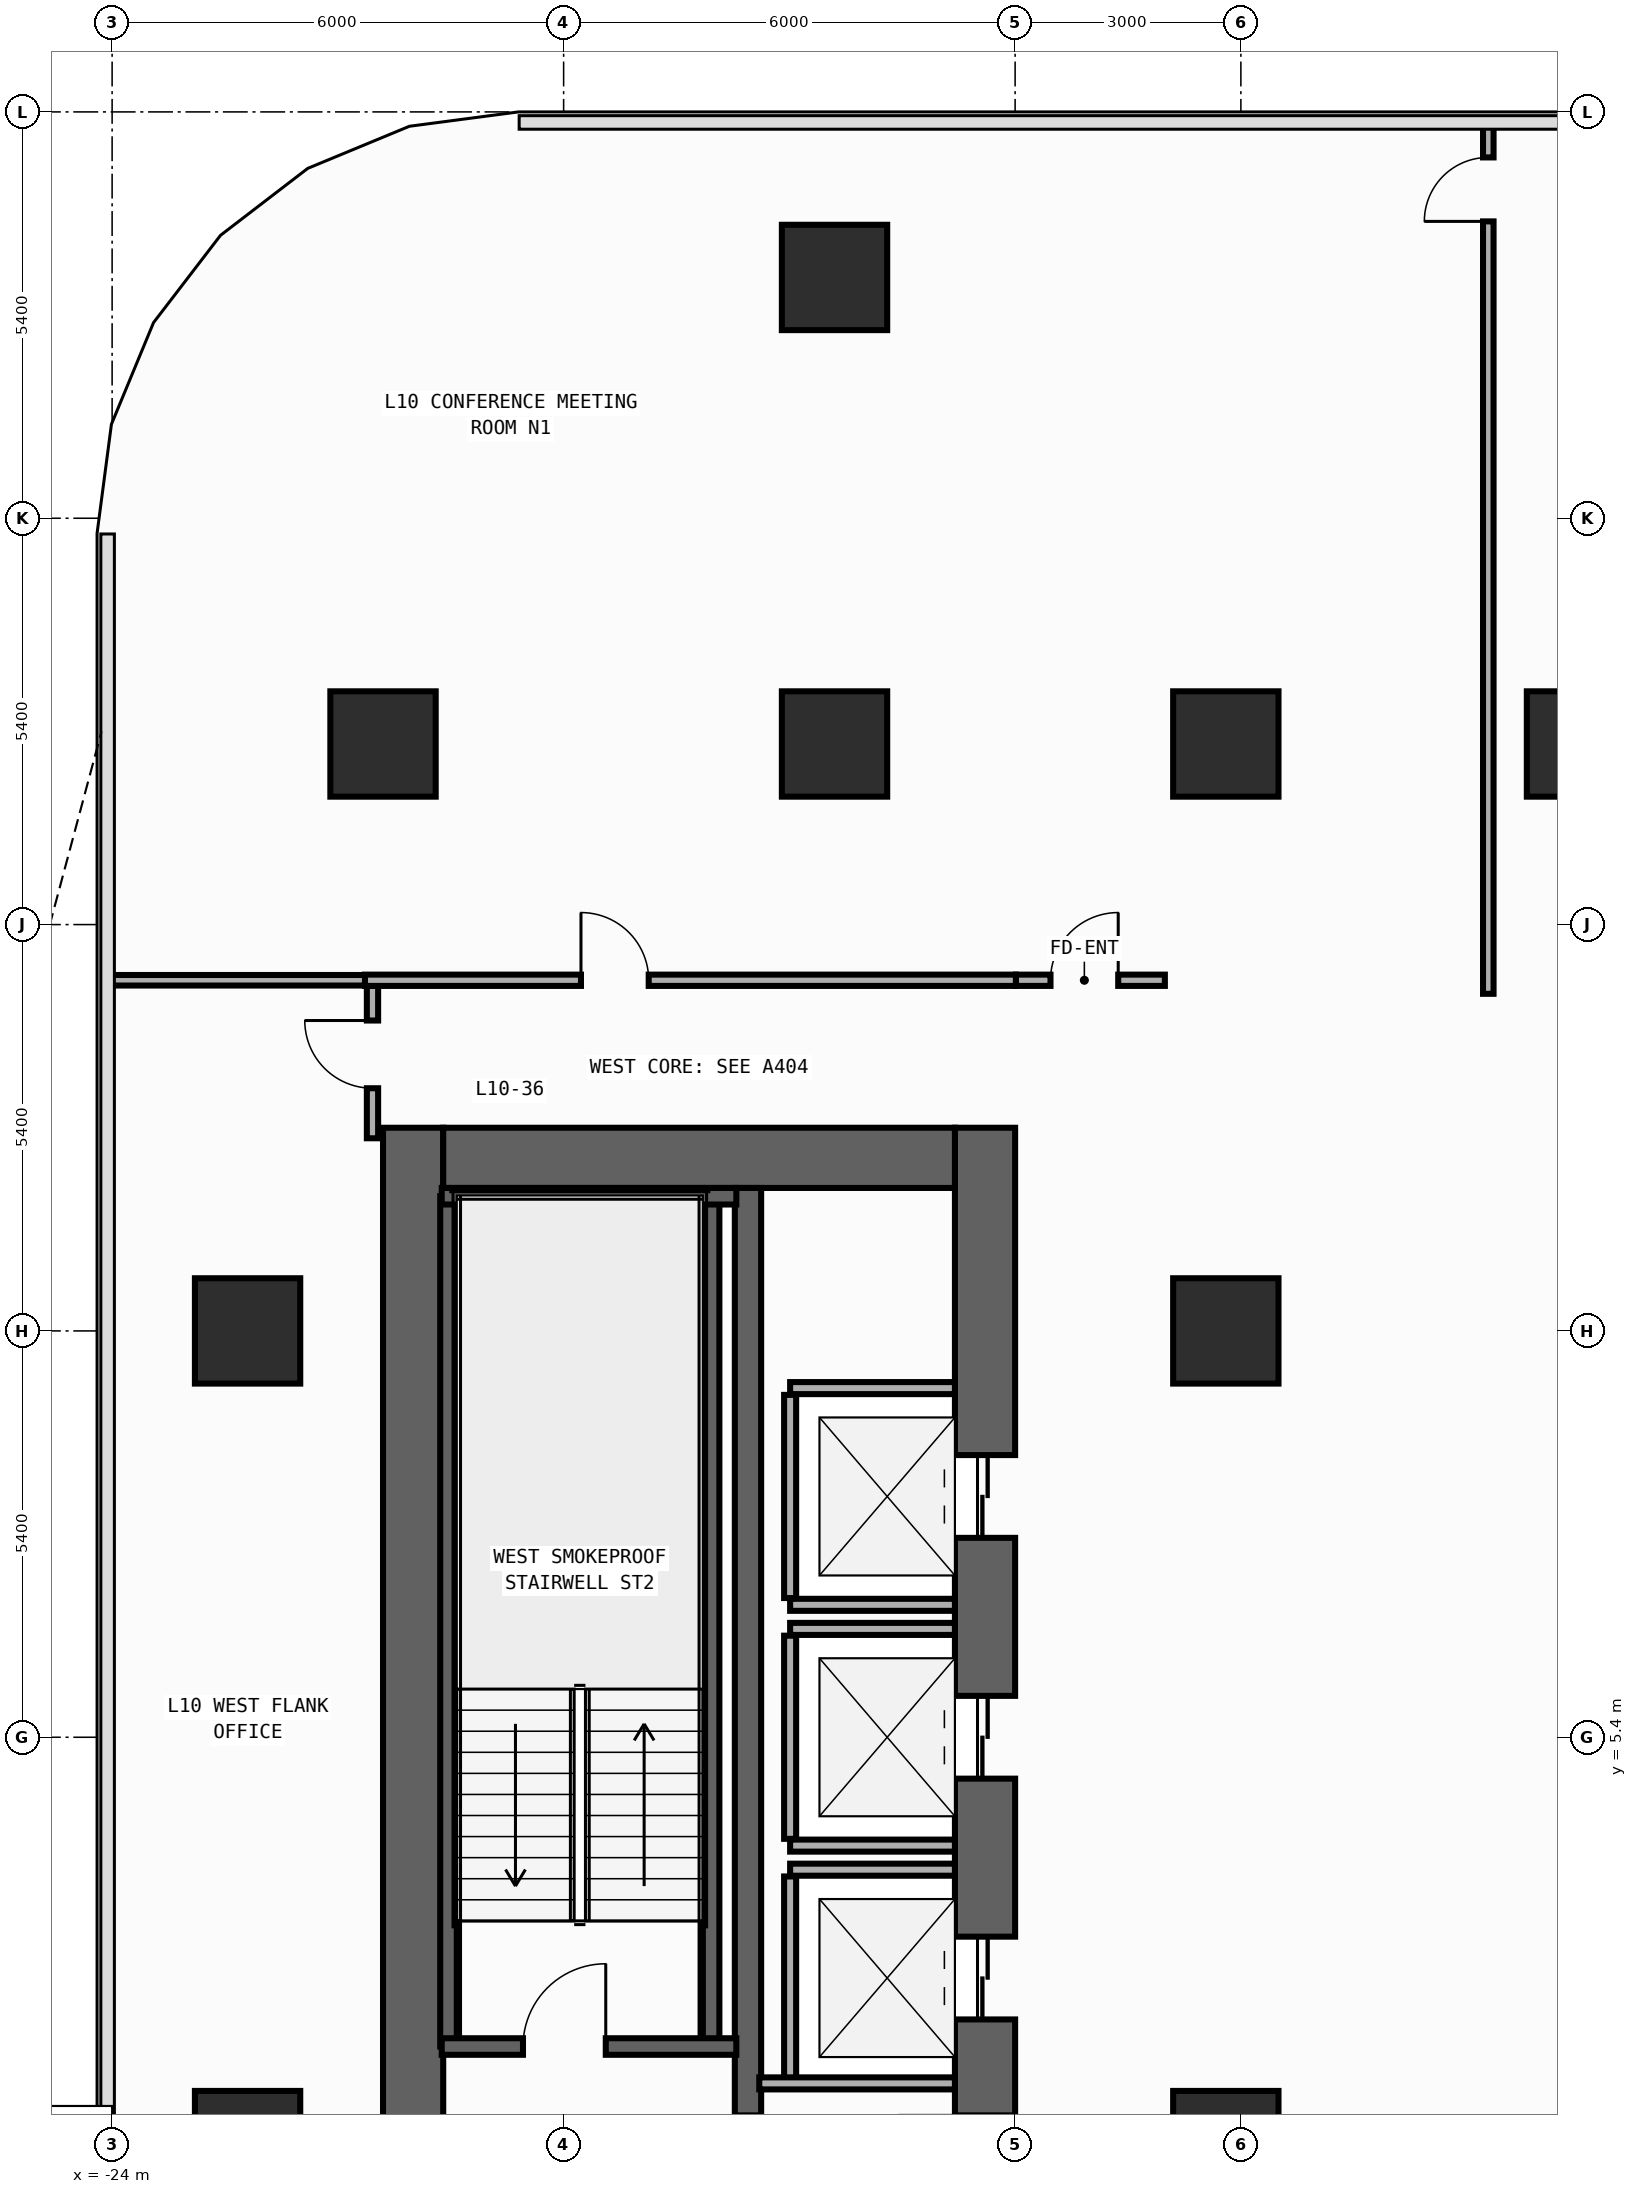
"""IFC4 building model, lengths in metres.
Left out: names, types, materials, properties, quantities, classifications, styles, units other than length and angle.
Written with IfcOpenShell. Run it as: python <this file> out.ifc"""

import sys

from ifc_helpers import new_model, si_unit, direction, frame, frame_2d, origin, origin_2d, place, context, subcontext, project, spatial, rectangle, extrude, element, fill, save


model = new_model("IFC4")
c1 = context("Model", 3, precision=1e-05, world=origin(), true_north=direction((0.0, 1.0)))
c2 = subcontext(c1, "Body", "Model", "MODEL_VIEW")
j1 = project(units=[si_unit("LENGTHUNIT", "METRE"), si_unit("PLANEANGLEUNIT", "RADIAN")], contexts=[c1])
p1 = place(None, origin())
s1 = spatial("IfcSite", under=j1, at=p1, CompositionType="ELEMENT")
p2 = place(p1, origin())
s2 = spatial("IfcBuilding", under=s1, at=p2, CompositionType="ELEMENT")
p3 = place(p2, frame((0.0, 0.0, 42.8)))
s3 = spatial("IfcBuildingStorey", under=s2, at=p3, CompositionType="ELEMENT", Elevation=42.8)
p4 = place(p3, frame((-20.0, -13.5, 0.0), z_axis=(0.0, 0.0, 1.0), x_axis=(0.0, 1.0, 0.0)))
e1 = element("IfcWall", 1, at=p4, inside=s3, PredefinedType="SHEAR", context=c2, shape_type="SweptSolid", body=[
    extrude(rectangle(XDim=27.0, YDim=0.8, at=frame_2d((13.5, 0.0))), origin(), (0.0, 0.0, 1.0), 3.94),
])
p5 = place(p3, frame((-12.4, -13.5, 0.0), z_axis=(0.0, 0.0, 1.0), x_axis=(0.0, 1.0, 0.0)))
e2 = element("IfcWall", 2, at=p5, inside=s3, PredefinedType="SHEAR", context=c2, shape_type="SweptSolid", body=[
    extrude(rectangle(XDim=27.0, YDim=0.8, at=frame_2d((13.5, 0.0))), origin(), (0.0, 0.0, 1.0), 3.94),
])
p6 = place(p5, frame((21.55, 0.0, 0.0)))
e3 = element("IfcOpeningElement", 3, at=p6, cuts=e2, PredefinedType="OPENING", context=c2, shape_type="SweptSolid", body=[
    extrude(rectangle(XDim=1.1, YDim=2.2, at=frame_2d((0.55, 1.1))), frame((0.0, 0.41, 0.0), z_axis=(0.0, -1.0, 0.0), x_axis=(1.0, 0.0, 0.0)), (0.0, 0.0, 1.0), 0.82),
])
p7 = place(p5, frame((18.35, 0.0, 0.0)))
e4 = element("IfcOpeningElement", 4, at=p7, cuts=e2, PredefinedType="OPENING", context=c2, shape_type="SweptSolid", body=[
    extrude(rectangle(XDim=1.1, YDim=2.2, at=frame_2d((0.55, 1.1))), frame((0.0, 0.41, 0.0), z_axis=(0.0, -1.0, 0.0), x_axis=(1.0, 0.0, 0.0)), (0.0, 0.0, 1.0), 0.82),
])
p8 = place(p5, frame((15.15, 0.0, 0.0)))
e5 = element("IfcOpeningElement", 5, at=p8, cuts=e2, PredefinedType="OPENING", context=c2, shape_type="SweptSolid", body=[
    extrude(rectangle(XDim=1.1, YDim=2.2, at=frame_2d((0.55, 1.1))), frame((0.0, 0.41, 0.0), z_axis=(0.0, -1.0, 0.0), x_axis=(1.0, 0.0, 0.0)), (0.0, 0.0, 1.0), 0.82),
])
p9 = place(p5, frame((10.35, 0.0, 0.0)))
e6 = element("IfcOpeningElement", 6, at=p9, cuts=e2, PredefinedType="OPENING", context=c2, shape_type="SweptSolid", body=[
    extrude(rectangle(XDim=1.1, YDim=2.2, at=frame_2d((0.55, 1.1))), frame((0.0, 0.41, 0.0), z_axis=(0.0, -1.0, 0.0), x_axis=(1.0, 0.0, 0.0)), (0.0, 0.0, 1.0), 0.82),
])
p10 = place(p5, frame((7.15, 0.0, 0.0)))
e7 = element("IfcOpeningElement", 7, at=p10, cuts=e2, PredefinedType="OPENING", context=c2, shape_type="SweptSolid", body=[
    extrude(rectangle(XDim=1.1, YDim=2.2, at=frame_2d((0.55, 1.1))), frame((0.0, 0.41, 0.0), z_axis=(0.0, -1.0, 0.0), x_axis=(1.0, 0.0, 0.0)), (0.0, 0.0, 1.0), 0.82),
])
p11 = place(p5, frame((3.95, 0.0, 0.0)))
e8 = element("IfcOpeningElement", 8, at=p11, cuts=e2, PredefinedType="OPENING", context=c2, shape_type="SweptSolid", body=[
    extrude(rectangle(XDim=1.1, YDim=2.2, at=frame_2d((0.55, 1.1))), frame((0.0, 0.41, 0.0), z_axis=(0.0, -1.0, 0.0), x_axis=(1.0, 0.0, 0.0)), (0.0, 0.0, 1.0), 0.82),
])
p12 = place(p5, frame((12.725, 0.0, 0.0)))
e9 = element("IfcOpeningElement", 9, at=p12, cuts=e2, PredefinedType="OPENING", context=c2, shape_type="SweptSolid", body=[
    extrude(rectangle(XDim=1.15, YDim=2.2, at=frame_2d((0.575, 1.1))), frame((0.0, 0.41, 0.0), z_axis=(0.0, -1.0, 0.0), x_axis=(1.0, 0.0, 0.0)), (0.0, 0.0, 1.0), 0.82),
])
p13 = place(p5, frame((1.625, 0.0, 0.0)))
e10 = element("IfcOpeningElement", 10, at=p13, cuts=e2, PredefinedType="OPENING", context=c2, shape_type="SweptSolid", body=[
    extrude(rectangle(XDim=0.85, YDim=2.1, at=frame_2d((0.425, 1.05))), frame((0.0, 0.41, 0.0), z_axis=(0.0, -1.0, 0.0), x_axis=(1.0, 0.0, 0.0)), (0.0, 0.0, 1.0), 0.82),
])
p14 = place(p3, frame((-19.6, 13.1, 0.0), z_axis=(0.0, 0.0, 1.0), x_axis=(1.0, 0.0, 0.0)))
e11 = element("IfcWall", 11, at=p14, inside=s3, PredefinedType="SHEAR", context=c2, shape_type="SweptSolid", body=[
    extrude(rectangle(XDim=6.8, YDim=0.8, at=frame_2d((3.4, 0.0))), origin(), (0.0, 0.0, 1.0), 3.94),
])
p15 = place(p3, frame((-15.55, -12.7, 0.0), z_axis=(0.0, 0.0, 1.0), x_axis=(0.0, 1.0, 0.0)))
e12 = element("IfcWall", 12, at=p15, inside=s3, PredefinedType="SHEAR", context=c2, shape_type="SweptSolid", body=[
    extrude(rectangle(XDim=25.4, YDim=0.35, at=frame_2d((12.7, 0.0))), origin(), (0.0, 0.0, 1.0), 3.94),
])
p16 = place(p15, frame((11.925, 0.0, 0.0)))
e13 = element("IfcOpeningElement", 13, at=p16, cuts=e12, PredefinedType="OPENING", context=c2, shape_type="SweptSolid", body=[
    extrude(rectangle(XDim=1.15, YDim=2.2, at=frame_2d((0.575, 1.1))), frame((0.0, 0.185, 0.0), z_axis=(0.0, -1.0, 0.0), x_axis=(1.0, 0.0, 0.0)), (0.0, 0.0, 1.0), 0.37),
])
p17 = place(p15, frame((0.825, 0.0, 0.0)))
e14 = element("IfcOpeningElement", 14, at=p17, cuts=e12, PredefinedType="OPENING", context=c2, shape_type="SweptSolid", body=[
    extrude(rectangle(XDim=0.85, YDim=2.1, at=frame_2d((0.425, 1.05))), frame((0.0, 0.185, 0.0), z_axis=(0.0, -1.0, 0.0), x_axis=(1.0, 0.0, 0.0)), (0.0, 0.0, 1.0), 0.37),
])
for number, where, z_axis, x_axis in (
    (15, (-16.04, 1.29, 0.0), (0.0, 0.0, 1.0), (0.0, 1.0, 0.0)),
    (16, (-19.53, 1.29, 0.0), (0.0, 0.0, 1.0), (0.0, 1.0, 0.0)),
):
    element("IfcWall", number, at=place(p3, frame(where, z_axis=z_axis, x_axis=x_axis)), inside=s3, PredefinedType="SHEAR", context=c2, shape_type="SweptSolid", body=[
        extrude(rectangle(XDim=11.3, YDim=0.22, at=frame_2d((5.65, 0.0))), origin(), (0.0, 0.0, 1.0), 3.94),
    ])
p18 = place(p3, frame((-19.62, 12.59, 0.0), z_axis=(0.0, 0.0, 1.0), x_axis=(1.0, 0.0, 0.0)))
e17 = element("IfcWall", 17, at=p18, inside=s3, PredefinedType="SHEAR", context=c2, shape_type="SweptSolid", body=[
    extrude(rectangle(XDim=3.915, YDim=0.22, at=frame_2d((1.958, 0.0))), origin(), (0.0, 0.0, 1.0), 3.94),
])
p19 = place(p3, frame((-19.62, 1.29, 0.0), z_axis=(0.0, 0.0, 1.0), x_axis=(1.0, 0.0, 0.0)))
e18 = element("IfcWall", 18, at=p19, inside=s3, PredefinedType="SHEAR", context=c2, shape_type="SweptSolid", body=[
    extrude(rectangle(XDim=3.915, YDim=0.22, at=frame_2d((1.958, 0.0))), origin(), (0.0, 0.0, 1.0), 3.94),
])
p20 = place(p19, frame((1.08, 0.0, 0.0)))
e19 = element("IfcOpeningElement", 19, at=p20, cuts=e18, PredefinedType="OPENING", context=c2, shape_type="SweptSolid", body=[
    extrude(rectangle(XDim=1.1, YDim=2.2, at=frame_2d((0.55, 1.1))), frame((0.0, 0.12, 0.0), z_axis=(0.0, -1.0, 0.0), x_axis=(1.0, 0.0, 0.0)), (0.0, 0.0, 1.0), 0.24),
])
for number, where, z_axis, x_axis in (
    (20, (-9.2, 0.0, 0.0), (0.0, 0.0, 1.0), (1.0, 0.0, 0.0)),
    (21, (-9.2, 10.8, 0.0), (0.0, 0.0, 1.0), (1.0, 0.0, 0.0)),
    (22, (-9.2, 18.6, 0.0), (0.0, 0.0, 1.0), (1.0, 0.0, 0.0)),
    (23, (-20.4, 18.6, 0.0), (0.0, 0.0, 1.0), (1.0, 0.0, 0.0)),
    (24, (-14.4, 18.6, 0.0), (0.0, 0.0, 1.0), (1.0, 0.0, 0.0)),
    (25, (-4.5, 18.6, 0.0), (0.0, 0.0, 1.0), (1.0, 0.0, 0.0)),
    (26, (-22.2, 0.0, 0.0), (0.0, 0.0, 1.0), (1.0, 0.0, 0.0)),
    (27, (-22.2, 10.8, 0.0), (0.0, 0.0, 1.0), (1.0, 0.0, 0.0)),
    (28, (-14.4, 24.8, 0.0), (0.0, 0.0, 1.0), (1.0, 0.0, 0.0)),
):
    element("IfcColumn", number, at=place(p3, frame(where, z_axis=z_axis, x_axis=x_axis)), inside=s3, PredefinedType="COLUMN", context=c2, shape_type="SweptSolid", body=[
        extrude(rectangle(XDim=1.4, YDim=1.4, at=origin_2d()), origin(), (0.0, 0.0, 1.0), 4.2),
    ])
for number, where, z_axis, x_axis in (
    (29, (-14.99, 7.16, 0.0), (0.0, 0.0, 1.0), (1.0, 0.0, 0.0)),
    (30, (-14.99, 10.04, 0.0), (0.0, 0.0, 1.0), (1.0, 0.0, 0.0)),
):
    element("IfcWall", number, at=place(p3, frame(where, z_axis=z_axis, x_axis=x_axis)), inside=s3, PredefinedType="STANDARD", context=c2, shape_type="SweptSolid", body=[
        extrude(rectangle(XDim=2.19, YDim=0.16, at=frame_2d((1.095, 0.0))), origin(), (0.0, 0.0, 1.0), 3.94),
    ])
p21 = place(p3, frame((-14.99, 7.25, 0.0), z_axis=(0.0, 0.0, 1.0), x_axis=(0.0, 1.0, 0.0)))
e31 = element("IfcWall", 31, at=p21, inside=s3, PredefinedType="STANDARD", context=c2, shape_type="SweptSolid", body=[
    extrude(rectangle(XDim=2.7, YDim=0.16, at=frame_2d((1.35, 0.0))), origin(), (0.0, 0.0, 1.0), 3.94),
])
for number, where, z_axis, x_axis in (
    (32, (-14.99, 3.96, 0.0), (0.0, 0.0, 1.0), (1.0, 0.0, 0.0)),
    (33, (-14.99, 6.84, 0.0), (0.0, 0.0, 1.0), (1.0, 0.0, 0.0)),
):
    element("IfcWall", number, at=place(p3, frame(where, z_axis=z_axis, x_axis=x_axis)), inside=s3, PredefinedType="STANDARD", context=c2, shape_type="SweptSolid", body=[
        extrude(rectangle(XDim=2.19, YDim=0.16, at=frame_2d((1.095, 0.0))), origin(), (0.0, 0.0, 1.0), 3.94),
    ])
p22 = place(p3, frame((-14.99, 4.05, 0.0), z_axis=(0.0, 0.0, 1.0), x_axis=(0.0, 1.0, 0.0)))
e34 = element("IfcWall", 34, at=p22, inside=s3, PredefinedType="STANDARD", context=c2, shape_type="SweptSolid", body=[
    extrude(rectangle(XDim=2.7, YDim=0.16, at=frame_2d((1.35, 0.0))), origin(), (0.0, 0.0, 1.0), 3.94),
])
p23 = place(p3, frame((-14.99, 3.64, 0.0), z_axis=(0.0, 0.0, 1.0), x_axis=(1.0, 0.0, 0.0)))
e35 = element("IfcWall", 35, at=p23, inside=s3, PredefinedType="STANDARD", context=c2, shape_type="SweptSolid", body=[
    extrude(rectangle(XDim=2.19, YDim=0.16, at=frame_2d((1.095, 0.0))), origin(), (0.0, 0.0, 1.0), 3.94),
])
p24 = place(p3, frame((-14.99, 0.85, 0.0), z_axis=(0.0, 0.0, 1.0), x_axis=(0.0, 1.0, 0.0)))
e36 = element("IfcWall", 36, at=p24, inside=s3, PredefinedType="STANDARD", context=c2, shape_type="SweptSolid", body=[
    extrude(rectangle(XDim=2.7, YDim=0.16, at=frame_2d((1.35, 0.0))), origin(), (0.0, 0.0, 1.0), 3.94),
])
p25 = place(p3, frame((-15.4, 0.8, 0.0), z_axis=(0.0, 0.0, 1.0), x_axis=(1.0, 0.0, 0.0)))
e37 = element("IfcWall", 37, at=p25, inside=s3, PredefinedType="STANDARD", context=c2, shape_type="SweptSolid", body=[
    extrude(rectangle(XDim=2.6, YDim=0.16, at=frame_2d((1.3, 0.0))), origin(), (0.0, 0.0, 1.0), 3.94),
])
p26 = place(p3, frame((-11.99, 15.46, 0.0), z_axis=(0.0, 0.0, 1.0), x_axis=(1.0, 0.0, 0.0)))
e38 = element("IfcWall", 38, at=p26, inside=s3, PredefinedType="PARTITIONING", context=c2, shape_type="SweptSolid", body=[
    extrude(rectangle(XDim=1.98, YDim=0.15, at=frame_2d((0.99, 0.0))), origin(), (0.0, 0.0, 1.0), 3.94),
])
p27 = place(p26, frame((0.46, 0.0, 0.0)))
e39 = element("IfcOpeningElement", 39, at=p27, cuts=e38, PredefinedType="OPENING", context=c2, shape_type="SweptSolid", body=[
    extrude(rectangle(XDim=0.9, YDim=2.15, at=frame_2d((0.45, 1.075))), frame((0.0, 0.085, 0.0), z_axis=(0.0, -1.0, 0.0), x_axis=(1.0, 0.0, 0.0)), (0.0, 0.0, 1.0), 0.17),
])
p28 = place(p3, frame((-20.54, 13.36, 0.0), z_axis=(0.0, 0.0, 1.0), x_axis=(0.0, 1.0, 0.0)))
e40 = element("IfcWall", 40, at=p28, inside=s3, PredefinedType="PARTITIONING", context=c2, shape_type="SweptSolid", body=[
    extrude(rectangle(XDim=2.025, YDim=0.15, at=frame_2d((1.012, 0.0))), origin(), (0.0, 0.0, 1.0), 3.94),
])
p29 = place(p28, frame((0.665, 0.0, 0.0)))
e41 = element("IfcOpeningElement", 41, at=p29, cuts=e40, PredefinedType="OPENING", context=c2, shape_type="SweptSolid", body=[
    extrude(rectangle(XDim=0.9, YDim=2.15, at=frame_2d((0.45, 1.075))), frame((0.0, 0.085, 0.0), z_axis=(0.0, -1.0, 0.0), x_axis=(1.0, 0.0, 0.0)), (0.0, 0.0, 1.0), 0.17),
])
p30 = place(p3, frame((-20.64, 15.46, 0.0), z_axis=(0.0, 0.0, 1.0), x_axis=(1.0, 0.0, 0.0)))
e42 = element("IfcWall", 42, at=p30, inside=s3, PredefinedType="PARTITIONING", context=c2, shape_type="SweptSolid", body=[
    extrude(rectangle(XDim=8.65, YDim=0.15, at=frame_2d((4.325, 0.0))), origin(), (0.0, 0.0, 1.0), 3.94),
])
p31 = place(p30, frame((2.871, 0.0, 0.0)))
e43 = element("IfcOpeningElement", 43, at=p31, cuts=e42, PredefinedType="OPENING", context=c2, shape_type="SweptSolid", body=[
    extrude(rectangle(XDim=0.9, YDim=2.15, at=frame_2d((0.45, 1.075))), frame((0.0, 0.085, 0.0), z_axis=(0.0, -1.0, 0.0), x_axis=(1.0, 0.0, 0.0)), (0.0, 0.0, 1.0), 0.17),
])
p32 = place(p3, frame((-24.055, 15.46, 0.0), z_axis=(0.0, 0.0, 1.0), x_axis=(1.0, 0.0, 0.0)))
e44 = element("IfcWall", 44, at=p32, inside=s3, PredefinedType="PARTITIONING", context=c2, shape_type="SweptSolid", body=[
    extrude(rectangle(XDim=3.415, YDim=0.14, at=frame_2d((1.708, 0.0))), origin(), (0.0, 0.0, 1.0), 3.94),
])
p33 = place(p3, frame((-5.712, 15.28, 0.0), z_axis=(0.0, 0.0, 1.0), x_axis=(0.0, 1.0, 0.0)))
e45 = element("IfcWall", 45, at=p33, inside=s3, PredefinedType="PARTITIONING", context=c2, shape_type="SweptSolid", body=[
    extrude(rectangle(XDim=11.575, YDim=0.14, at=frame_2d((5.788, 0.0))), origin(), (0.0, 0.0, 1.0), 3.94),
])
p34 = place(p33, frame((10.265, 0.0, 0.0)))
e46 = element("IfcOpeningElement", 46, at=p34, cuts=e45, PredefinedType="OPENING", context=c2, shape_type="SweptSolid", body=[
    extrude(rectangle(XDim=0.85, YDim=2.1, at=frame_2d((0.425, 1.05))), frame((0.0, 0.08, 0.0), z_axis=(0.0, -1.0, 0.0), x_axis=(1.0, 0.0, 0.0)), (0.0, 0.0, 1.0), 0.16),
])
p35 = place(p20, origin())
e47 = element("IfcDoor", 47, at=p35, inside=s3, OperationType="SINGLE_SWING_RIGHT", PredefinedType="DOOR", context=c2, shape_type="SweptSolid", body=[
    extrude(rectangle(XDim=1.1, YDim=2.2, at=frame_2d((0.55, 1.1))), frame((0.0, 0.025, 0.0), z_axis=(0.0, -1.0, 0.0), x_axis=(1.0, 0.0, 0.0)), (0.0, 0.0, 1.0), 0.05),
])
fill(e19, e47)
p36 = place(p6, origin())
e48 = element("IfcDoor", 48, at=p36, inside=s3, OperationType="DOUBLE_DOOR_SLIDING", PredefinedType="DOOR", context=c2, shape_type="SweptSolid", body=[
    extrude(rectangle(XDim=1.1, YDim=2.2, at=frame_2d((0.55, 1.1))), frame((0.0, 0.025, 0.0), z_axis=(0.0, -1.0, 0.0), x_axis=(1.0, 0.0, 0.0)), (0.0, 0.0, 1.0), 0.05),
])
fill(e3, e48)
p37 = place(p7, origin())
e49 = element("IfcDoor", 49, at=p37, inside=s3, OperationType="DOUBLE_DOOR_SLIDING", PredefinedType="DOOR", context=c2, shape_type="SweptSolid", body=[
    extrude(rectangle(XDim=1.1, YDim=2.2, at=frame_2d((0.55, 1.1))), frame((0.0, 0.025, 0.0), z_axis=(0.0, -1.0, 0.0), x_axis=(1.0, 0.0, 0.0)), (0.0, 0.0, 1.0), 0.05),
])
fill(e4, e49)
p38 = place(p8, origin())
e50 = element("IfcDoor", 50, at=p38, inside=s3, OperationType="DOUBLE_DOOR_SLIDING", PredefinedType="DOOR", context=c2, shape_type="SweptSolid", body=[
    extrude(rectangle(XDim=1.1, YDim=2.2, at=frame_2d((0.55, 1.1))), frame((0.0, 0.025, 0.0), z_axis=(0.0, -1.0, 0.0), x_axis=(1.0, 0.0, 0.0)), (0.0, 0.0, 1.0), 0.05),
])
fill(e5, e50)
p39 = place(p27, origin())
e51 = element("IfcDoor", 51, at=p39, inside=s3, OperationType="SINGLE_SWING_RIGHT", PredefinedType="DOOR", context=c2, shape_type="SweptSolid", body=[
    extrude(rectangle(XDim=0.9, YDim=2.15, at=frame_2d((0.45, 1.075))), frame((0.0, 0.025, 0.0), z_axis=(0.0, -1.0, 0.0), x_axis=(1.0, 0.0, 0.0)), (0.0, 0.0, 1.0), 0.05),
])
fill(e39, e51)
p40 = place(p29, origin())
e52 = element("IfcDoor", 52, at=p40, inside=s3, OperationType="SINGLE_SWING_RIGHT", PredefinedType="DOOR", context=c2, shape_type="SweptSolid", body=[
    extrude(rectangle(XDim=0.9, YDim=2.15, at=frame_2d((0.45, 1.075))), frame((0.0, 0.025, 0.0), z_axis=(0.0, -1.0, 0.0), x_axis=(1.0, 0.0, 0.0)), (0.0, 0.0, 1.0), 0.05),
])
fill(e41, e52)
p41 = place(p31, origin())
e53 = element("IfcDoor", 53, at=p41, inside=s3, OperationType="SINGLE_SWING_LEFT", PredefinedType="DOOR", context=c2, shape_type="SweptSolid", body=[
    extrude(rectangle(XDim=0.9, YDim=2.15, at=frame_2d((0.45, 1.075))), frame((0.0, 0.025, 0.0), z_axis=(0.0, -1.0, 0.0), x_axis=(1.0, 0.0, 0.0)), (0.0, 0.0, 1.0), 0.05),
])
fill(e43, e53)
p42 = place(p34, origin())
e54 = element("IfcDoor", 54, at=p42, inside=s3, OperationType="SINGLE_SWING_LEFT", PredefinedType="DOOR", context=c2, shape_type="SweptSolid", body=[
    extrude(rectangle(XDim=0.85, YDim=2.1, at=frame_2d((0.425, 1.05))), frame((0.0, 0.025, 0.0), z_axis=(0.0, -1.0, 0.0), x_axis=(1.0, 0.0, 0.0)), (0.0, 0.0, 1.0), 0.05),
])
fill(e46, e54)
save(model, sys.argv[1])
